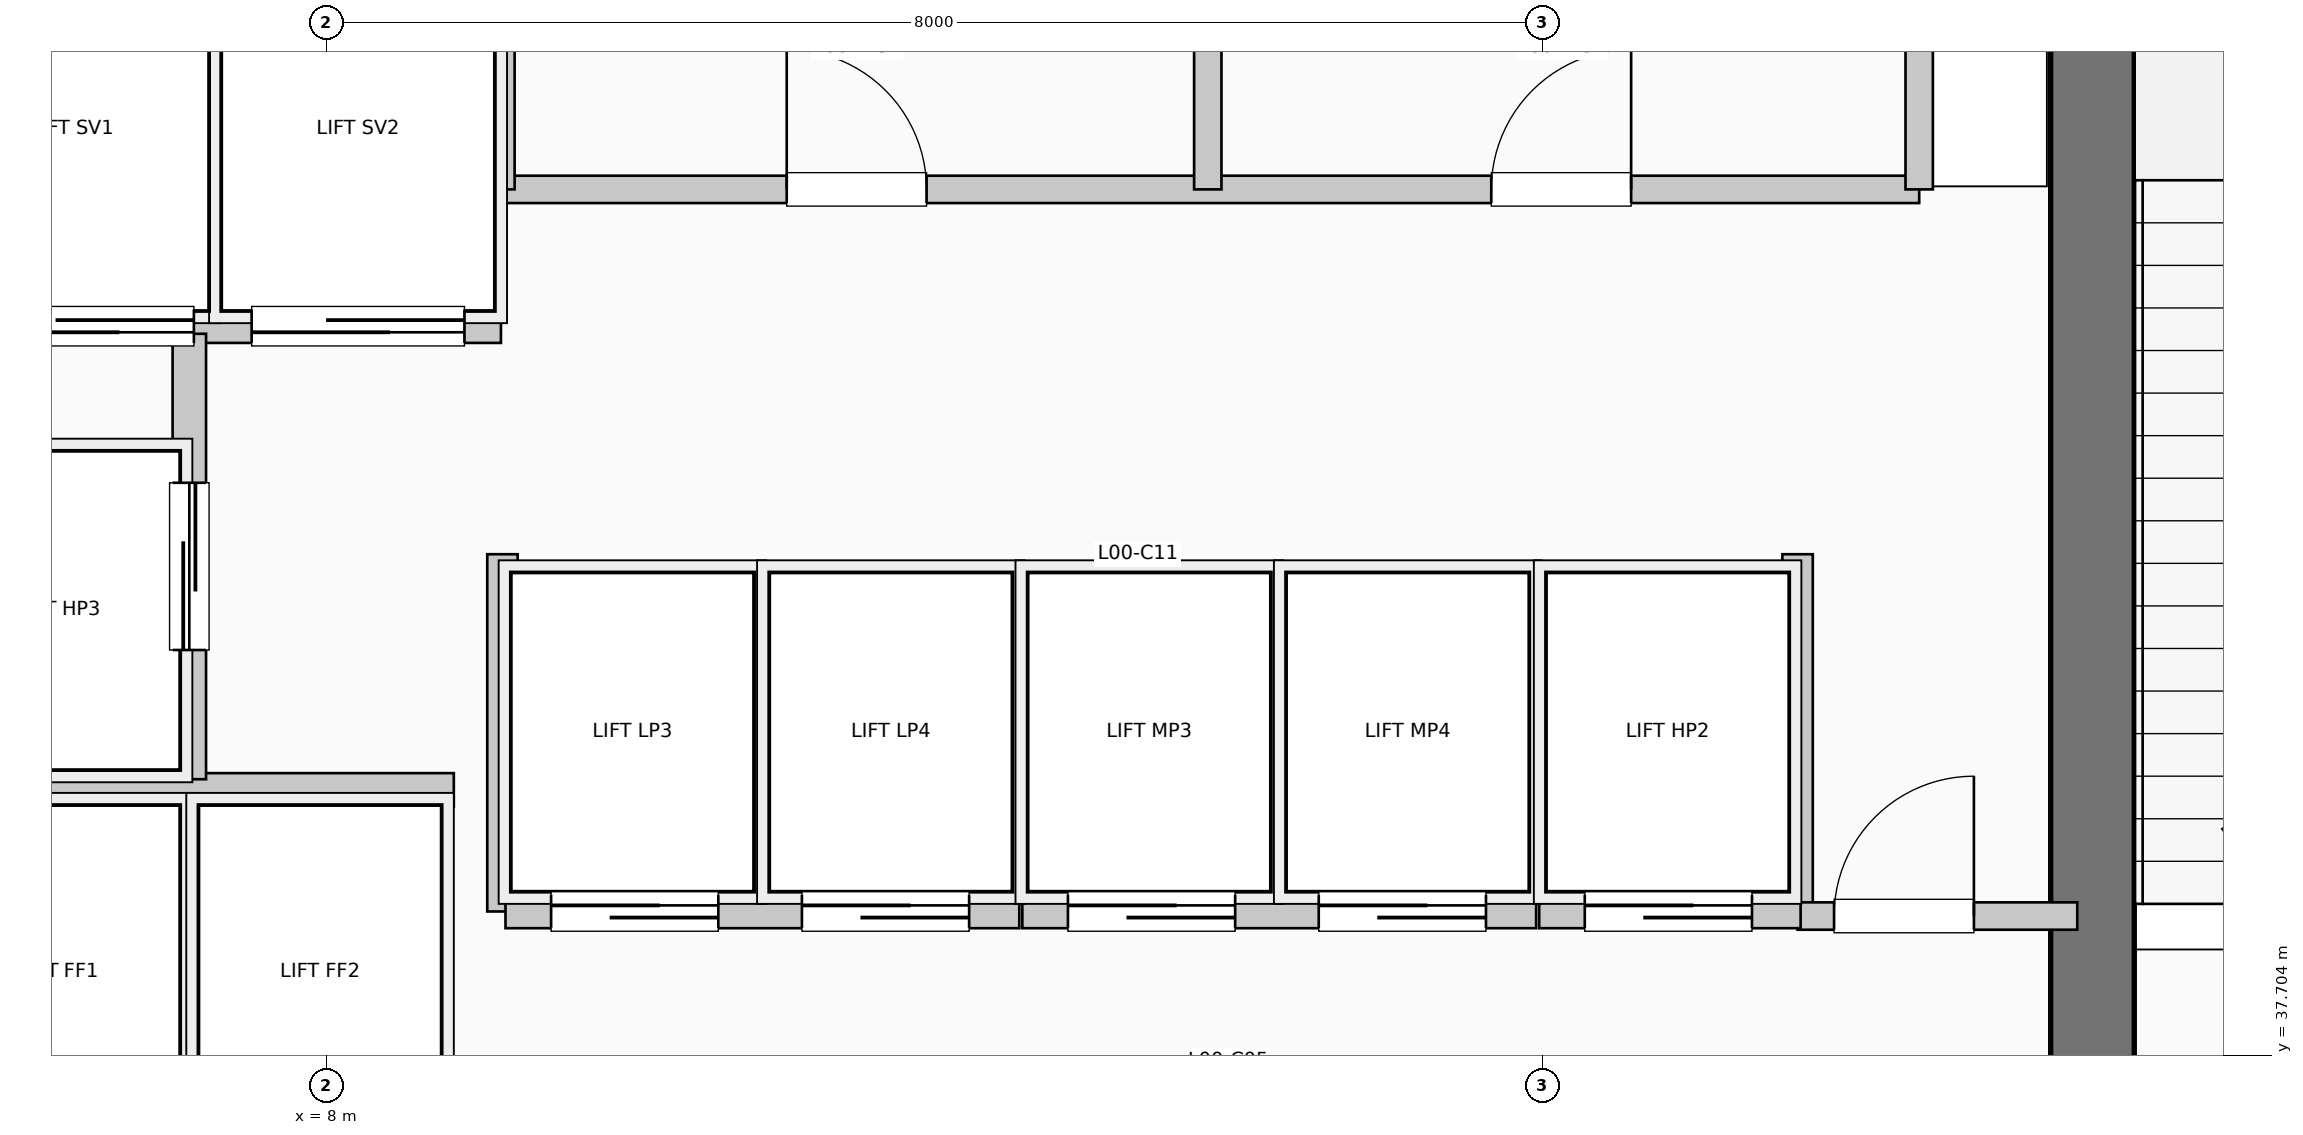
"""IFC4 building model, lengths in metres.
Left out: names, types, materials, properties, quantities, classifications, styles, units other than length and angle.
Written with IfcOpenShell. Run it as: python <this file> out.ifc"""

import sys

from ifc_helpers import new_model, si_unit, direction, frame, frame_2d, origin, place, context, subcontext, project, spatial, rectangle, extrude, element, fill, save


model = new_model("IFC4")
c1 = context("Model", 3, precision=1e-05, world=origin(), true_north=direction((0.0, 1.0)))
c2 = subcontext(c1, "Body", "Model", "MODEL_VIEW")
j1 = project(units=[si_unit("LENGTHUNIT", "METRE"), si_unit("PLANEANGLEUNIT", "RADIAN")], contexts=[c1])
p1 = place(None, origin())
s1 = spatial("IfcSite", under=j1, at=p1, CompositionType="ELEMENT")
p2 = place(p1, origin())
s2 = spatial("IfcBuilding", under=s1, at=p2, CompositionType="ELEMENT")
p3 = place(p2, origin())
s3 = spatial("IfcBuildingStorey", under=s2, at=p3, CompositionType="ELEMENT", Elevation=0.0)
p4 = place(p3, frame((19.62, 37.15, 0.0), z_axis=(0.0, 0.0, 1.0), x_axis=(0.0, 1.0, 0.0)))
e1 = element("IfcWall", 1, at=p4, inside=s3, PredefinedType="SHEAR", context=c2, shape_type="SweptSolid", body=[
    extrude(rectangle(XDim=7.89, YDim=0.55, at=frame_2d((3.945, 0.0))), origin(), (0.0, 0.0, 1.0), 5.94),
])
p5 = place(p3, frame((5.38, 39.45, 0.0), z_axis=(0.0, 0.0, 1.0), x_axis=(1.0, 0.0, 0.0)))
e2 = element("IfcWall", 2, at=p5, inside=s3, PredefinedType="PARTITIONING", context=c2, shape_type="SweptSolid", body=[
    extrude(rectangle(XDim=3.46, YDim=0.22, at=frame_2d((1.73, 0.0))), origin(), (0.0, 0.0, 1.0), 5.62),
])
p6 = place(p3, frame((5.38, 42.5, 0.0), z_axis=(0.0, 0.0, 1.0), x_axis=(1.0, 0.0, 0.0)))
e3 = element("IfcWall", 3, at=p6, inside=s3, PredefinedType="PARTITIONING", context=c2, shape_type="SweptSolid", body=[
    extrude(rectangle(XDim=3.77, YDim=0.22, at=frame_2d((1.885, 0.0))), origin(), (0.0, 0.0, 1.0), 5.62),
])
p7 = place(p6, frame((1.75, 0.0, 0.0), z_axis=(0.0, 0.0, 1.0), x_axis=(-1.0, 0.0, 0.0)))
e4 = element("IfcOpeningElement", 4, at=p7, cuts=e3, PredefinedType="OPENING", context=c2, shape_type="SweptSolid", body=[
    extrude(rectangle(XDim=1.4, YDim=2.2, at=frame_2d((0.7, 1.1))), frame((0.0, 0.12, 0.0), z_axis=(0.0, -1.0, 0.0), x_axis=(1.0, 0.0, 0.0)), (0.0, 0.0, 1.0), 0.24),
])
p8 = place(p6, frame((3.53, 0.0, 0.0), z_axis=(0.0, 0.0, 1.0), x_axis=(-1.0, 0.0, 0.0)))
e5 = element("IfcOpeningElement", 5, at=p8, cuts=e3, PredefinedType="OPENING", context=c2, shape_type="SweptSolid", body=[
    extrude(rectangle(XDim=1.4, YDim=2.2, at=frame_2d((0.7, 1.1))), frame((0.0, 0.12, 0.0), z_axis=(0.0, -1.0, 0.0), x_axis=(1.0, 0.0, 0.0)), (0.0, 0.0, 1.0), 0.24),
])
p9 = place(p3, frame((7.1, 39.52, 0.0), z_axis=(0.0, 0.0, 1.0), x_axis=(0.0, 1.0, 0.0)))
e6 = element("IfcWall", 6, at=p9, inside=s3, PredefinedType="PARTITIONING", context=c2, shape_type="SweptSolid", body=[
    extrude(rectangle(XDim=2.93, YDim=0.22, at=frame_2d((1.465, 0.0))), origin(), (0.0, 0.0, 1.0), 5.62),
])
p10 = place(p9, frame((0.85, 0.0, 0.0)))
e7 = element("IfcOpeningElement", 7, at=p10, cuts=e6, PredefinedType="OPENING", context=c2, shape_type="SweptSolid", body=[
    extrude(rectangle(XDim=1.1, YDim=2.2, at=frame_2d((0.55, 1.1))), frame((0.0, 0.12, 0.0), z_axis=(0.0, -1.0, 0.0), x_axis=(1.0, 0.0, 0.0)), (0.0, 0.0, 1.0), 0.24),
])
for number, where, z_axis, x_axis in (
    (8, (9.16, 38.65, 0.0), (0.0, 0.0, 1.0), (0.0, 1.0, 0.0)),
    (9, (17.68, 38.65, 0.0), (0.0, 0.0, 1.0), (0.0, 1.0, 0.0)),
):
    element("IfcWall", number, at=place(p3, frame(where, z_axis=z_axis, x_axis=x_axis)), inside=s3, PredefinedType="PARTITIONING", context=c2, shape_type="SweptSolid", body=[
        extrude(rectangle(XDim=2.35, YDim=0.2, at=frame_2d((1.175, 0.0))), origin(), (0.0, 0.0, 1.0), 5.62),
    ])
p11 = place(p3, frame((17.68, 38.62, 0.0), z_axis=(0.0, 0.0, 1.0), x_axis=(1.0, 0.0, 0.0)))
e10 = element("IfcWall", 10, at=p11, inside=s3, PredefinedType="PARTITIONING", context=c2, shape_type="SweptSolid", body=[
    extrude(rectangle(XDim=1.84, YDim=0.18, at=frame_2d((0.92, 0.0))), origin(), (0.0, 0.0, 1.0), 5.62),
])
p12 = place(p11, frame((0.24, 0.0, 0.0)))
e11 = element("IfcOpeningElement", 11, at=p12, cuts=e10, PredefinedType="OPENING", context=c2, shape_type="SweptSolid", body=[
    extrude(rectangle(XDim=0.92, YDim=2.1, at=frame_2d((0.46, 1.05))), frame((0.0, 0.1, 0.0), z_axis=(0.0, -1.0, 0.0), x_axis=(1.0, 0.0, 0.0)), (0.0, 0.0, 1.0), 0.2),
])
p13 = place(p3, frame((9.18, 38.65, 0.0), z_axis=(0.0, 0.0, 1.0), x_axis=(1.0, 0.0, 0.0)))
e12 = element("IfcWall", 12, at=p13, inside=s3, PredefinedType="PARTITIONING", context=c2, shape_type="SweptSolid", body=[
    extrude(rectangle(XDim=3.38, YDim=0.22, at=frame_2d((1.69, 0.0))), origin(), (0.0, 0.0, 1.0), 5.62),
])
p14 = place(p13, frame((0.3, 0.0, 0.0)))
e13 = element("IfcOpeningElement", 13, at=p14, cuts=e12, PredefinedType="OPENING", context=c2, shape_type="SweptSolid", body=[
    extrude(rectangle(XDim=1.1, YDim=2.2, at=frame_2d((0.55, 1.1))), frame((0.0, 0.12, 0.0), z_axis=(0.0, -1.0, 0.0), x_axis=(1.0, 0.0, 0.0)), (0.0, 0.0, 1.0), 0.24),
])
p15 = place(p13, frame((1.95, 0.0, 0.0)))
e14 = element("IfcOpeningElement", 14, at=p15, cuts=e12, PredefinedType="OPENING", context=c2, shape_type="SweptSolid", body=[
    extrude(rectangle(XDim=1.1, YDim=2.2, at=frame_2d((0.55, 1.1))), frame((0.0, 0.12, 0.0), z_axis=(0.0, -1.0, 0.0), x_axis=(1.0, 0.0, 0.0)), (0.0, 0.0, 1.0), 0.24),
])
p16 = place(p3, frame((12.58, 38.65, 0.0), z_axis=(0.0, 0.0, 1.0), x_axis=(1.0, 0.0, 0.0)))
e15 = element("IfcWall", 15, at=p16, inside=s3, PredefinedType="PARTITIONING", context=c2, shape_type="SweptSolid", body=[
    extrude(rectangle(XDim=3.38, YDim=0.22, at=frame_2d((1.69, 0.0))), origin(), (0.0, 0.0, 1.0), 5.62),
])
p17 = place(p16, frame((0.3, 0.0, 0.0)))
e16 = element("IfcOpeningElement", 16, at=p17, cuts=e15, PredefinedType="OPENING", context=c2, shape_type="SweptSolid", body=[
    extrude(rectangle(XDim=1.1, YDim=2.2, at=frame_2d((0.55, 1.1))), frame((0.0, 0.12, 0.0), z_axis=(0.0, -1.0, 0.0), x_axis=(1.0, 0.0, 0.0)), (0.0, 0.0, 1.0), 0.24),
])
p18 = place(p16, frame((1.95, 0.0, 0.0)))
e17 = element("IfcOpeningElement", 17, at=p18, cuts=e15, PredefinedType="OPENING", context=c2, shape_type="SweptSolid", body=[
    extrude(rectangle(XDim=1.1, YDim=2.2, at=frame_2d((0.55, 1.1))), frame((0.0, 0.12, 0.0), z_axis=(0.0, -1.0, 0.0), x_axis=(1.0, 0.0, 0.0)), (0.0, 0.0, 1.0), 0.24),
])
p19 = place(p3, frame((15.98, 38.65, 0.0), z_axis=(0.0, 0.0, 1.0), x_axis=(1.0, 0.0, 0.0)))
e18 = element("IfcWall", 18, at=p19, inside=s3, PredefinedType="PARTITIONING", context=c2, shape_type="SweptSolid", body=[
    extrude(rectangle(XDim=1.72, YDim=0.22, at=frame_2d((0.86, 0.0))), origin(), (0.0, 0.0, 1.0), 5.62),
])
p20 = place(p19, frame((0.3, 0.0, 0.0)))
e19 = element("IfcOpeningElement", 19, at=p20, cuts=e18, PredefinedType="OPENING", context=c2, shape_type="SweptSolid", body=[
    extrude(rectangle(XDim=1.1, YDim=2.2, at=frame_2d((0.55, 1.1))), frame((0.0, 0.12, 0.0), z_axis=(0.0, -1.0, 0.0), x_axis=(1.0, 0.0, 0.0)), (0.0, 0.0, 1.0), 0.24),
])
p21 = place(p3, frame((9.15, 43.4, 0.0), z_axis=(0.0, 0.0, 1.0), x_axis=(1.0, 0.0, 0.0)))
e20 = element("IfcWall", 20, at=p21, inside=s3, PredefinedType="PLUMBINGWALL", context=c2, shape_type="SweptSolid", body=[
    extrude(rectangle(XDim=9.33, YDim=0.18, at=frame_2d((4.665, 0.0))), origin(), (0.0, 0.0, 1.0), 5.62),
])
p22 = place(p21, frame((1.88, 0.0, 0.0)))
e21 = element("IfcOpeningElement", 21, at=p22, cuts=e20, PredefinedType="OPENING", context=c2, shape_type="SweptSolid", body=[
    extrude(rectangle(XDim=0.92, YDim=2.1, at=frame_2d((0.46, 1.05))), frame((0.0, 0.1, 0.0), z_axis=(0.0, -1.0, 0.0), x_axis=(1.0, 0.0, 0.0)), (0.0, 0.0, 1.0), 0.2),
])
p23 = place(p21, frame((6.515, 0.0, 0.0)))
e22 = element("IfcOpeningElement", 22, at=p23, cuts=e20, PredefinedType="OPENING", context=c2, shape_type="SweptSolid", body=[
    extrude(rectangle(XDim=0.92, YDim=2.1, at=frame_2d((0.46, 1.05))), frame((0.0, 0.1, 0.0), z_axis=(0.0, -1.0, 0.0), x_axis=(1.0, 0.0, 0.0)), (0.0, 0.0, 1.0), 0.2),
])
for number, where, z_axis, x_axis in (
    (23, (9.15, 43.4, 0.0), (0.0, 0.0, 1.0), (0.0, 1.0, 0.0)),
    (24, (18.48, 43.4, 0.0), (0.0, 0.0, 1.0), (0.0, 1.0, 0.0)),
    (25, (13.8, 43.4, 0.0), (0.0, 0.0, 1.0), (0.0, 1.0, 0.0)),
):
    element("IfcWall", number, at=place(p3, frame(where, z_axis=z_axis, x_axis=x_axis)), inside=s3, PredefinedType="PLUMBINGWALL", context=c2, shape_type="SweptSolid", body=[
        extrude(rectangle(XDim=1.88, YDim=0.18, at=frame_2d((0.94, 0.0))), origin(), (0.0, 0.0, 1.0), 5.62),
    ])
p24 = place(p7, origin())
e26 = element("IfcDoor", 26, at=p24, inside=s3, OperationType="SLIDING_TO_LEFT", PredefinedType="DOOR", context=c2, shape_type="SweptSolid", body=[
    extrude(rectangle(XDim=1.4, YDim=2.2, at=frame_2d((0.7, 1.1))), frame((0.0, 0.025, 0.0), z_axis=(0.0, -1.0, 0.0), x_axis=(1.0, 0.0, 0.0)), (0.0, 0.0, 1.0), 0.05),
])
fill(e4, e26)
p25 = place(p8, origin())
e27 = element("IfcDoor", 27, at=p25, inside=s3, OperationType="SLIDING_TO_LEFT", PredefinedType="DOOR", context=c2, shape_type="SweptSolid", body=[
    extrude(rectangle(XDim=1.4, YDim=2.2, at=frame_2d((0.7, 1.1))), frame((0.0, 0.025, 0.0), z_axis=(0.0, -1.0, 0.0), x_axis=(1.0, 0.0, 0.0)), (0.0, 0.0, 1.0), 0.05),
])
fill(e5, e27)
p26 = place(p10, origin())
e28 = element("IfcDoor", 28, at=p26, inside=s3, OperationType="SLIDING_TO_LEFT", PredefinedType="DOOR", context=c2, shape_type="SweptSolid", body=[
    extrude(rectangle(XDim=1.1, YDim=2.2, at=frame_2d((0.55, 1.1))), frame((0.0, 0.025, 0.0), z_axis=(0.0, -1.0, 0.0), x_axis=(1.0, 0.0, 0.0)), (0.0, 0.0, 1.0), 0.05),
])
fill(e7, e28)
p27 = place(p12, origin())
e29 = element("IfcDoor", 29, at=p27, inside=s3, OperationType="SINGLE_SWING_RIGHT", PredefinedType="DOOR", context=c2, shape_type="SweptSolid", body=[
    extrude(rectangle(XDim=0.92, YDim=2.1, at=frame_2d((0.46, 1.05))), frame((0.0, 0.025, 0.0), z_axis=(0.0, -1.0, 0.0), x_axis=(1.0, 0.0, 0.0)), (0.0, 0.0, 1.0), 0.05),
])
fill(e11, e29)
p28 = place(p14, origin())
e30 = element("IfcDoor", 30, at=p28, inside=s3, OperationType="SLIDING_TO_LEFT", PredefinedType="DOOR", context=c2, shape_type="SweptSolid", body=[
    extrude(rectangle(XDim=1.1, YDim=2.2, at=frame_2d((0.55, 1.1))), frame((0.0, 0.025, 0.0), z_axis=(0.0, -1.0, 0.0), x_axis=(1.0, 0.0, 0.0)), (0.0, 0.0, 1.0), 0.05),
])
fill(e13, e30)
p29 = place(p15, origin())
e31 = element("IfcDoor", 31, at=p29, inside=s3, OperationType="SLIDING_TO_LEFT", PredefinedType="DOOR", context=c2, shape_type="SweptSolid", body=[
    extrude(rectangle(XDim=1.1, YDim=2.2, at=frame_2d((0.55, 1.1))), frame((0.0, 0.025, 0.0), z_axis=(0.0, -1.0, 0.0), x_axis=(1.0, 0.0, 0.0)), (0.0, 0.0, 1.0), 0.05),
])
fill(e14, e31)
p30 = place(p17, origin())
e32 = element("IfcDoor", 32, at=p30, inside=s3, OperationType="SLIDING_TO_RIGHT", PredefinedType="DOOR", context=c2, shape_type="SweptSolid", body=[
    extrude(rectangle(XDim=1.1, YDim=2.2, at=frame_2d((0.55, 1.1))), frame((0.0, 0.025, 0.0), z_axis=(0.0, -1.0, 0.0), x_axis=(1.0, 0.0, 0.0)), (0.0, 0.0, 1.0), 0.05),
])
fill(e16, e32)
p31 = place(p18, origin())
e33 = element("IfcDoor", 33, at=p31, inside=s3, OperationType="SLIDING_TO_RIGHT", PredefinedType="DOOR", context=c2, shape_type="SweptSolid", body=[
    extrude(rectangle(XDim=1.1, YDim=2.2, at=frame_2d((0.55, 1.1))), frame((0.0, 0.025, 0.0), z_axis=(0.0, -1.0, 0.0), x_axis=(1.0, 0.0, 0.0)), (0.0, 0.0, 1.0), 0.05),
])
fill(e17, e33)
p32 = place(p20, origin())
e34 = element("IfcDoor", 34, at=p32, inside=s3, OperationType="SLIDING_TO_LEFT", PredefinedType="DOOR", context=c2, shape_type="SweptSolid", body=[
    extrude(rectangle(XDim=1.1, YDim=2.2, at=frame_2d((0.55, 1.1))), frame((0.0, 0.025, 0.0), z_axis=(0.0, -1.0, 0.0), x_axis=(1.0, 0.0, 0.0)), (0.0, 0.0, 1.0), 0.05),
])
fill(e19, e34)
p33 = place(p22, origin())
e35 = element("IfcDoor", 35, at=p33, inside=s3, OperationType="SINGLE_SWING_LEFT", PredefinedType="DOOR", context=c2, shape_type="SweptSolid", body=[
    extrude(rectangle(XDim=0.92, YDim=2.1, at=frame_2d((0.46, 1.05))), frame((0.0, 0.025, 0.0), z_axis=(0.0, -1.0, 0.0), x_axis=(1.0, 0.0, 0.0)), (0.0, 0.0, 1.0), 0.05),
])
fill(e21, e35)
p34 = place(p23, origin())
e36 = element("IfcDoor", 36, at=p34, inside=s3, OperationType="SINGLE_SWING_RIGHT", PredefinedType="DOOR", context=c2, shape_type="SweptSolid", body=[
    extrude(rectangle(XDim=0.92, YDim=2.1, at=frame_2d((0.46, 1.05))), frame((0.0, 0.025, 0.0), z_axis=(0.0, -1.0, 0.0), x_axis=(1.0, 0.0, 0.0)), (0.0, 0.0, 1.0), 0.05),
])
fill(e22, e36)
save(model, sys.argv[1])
